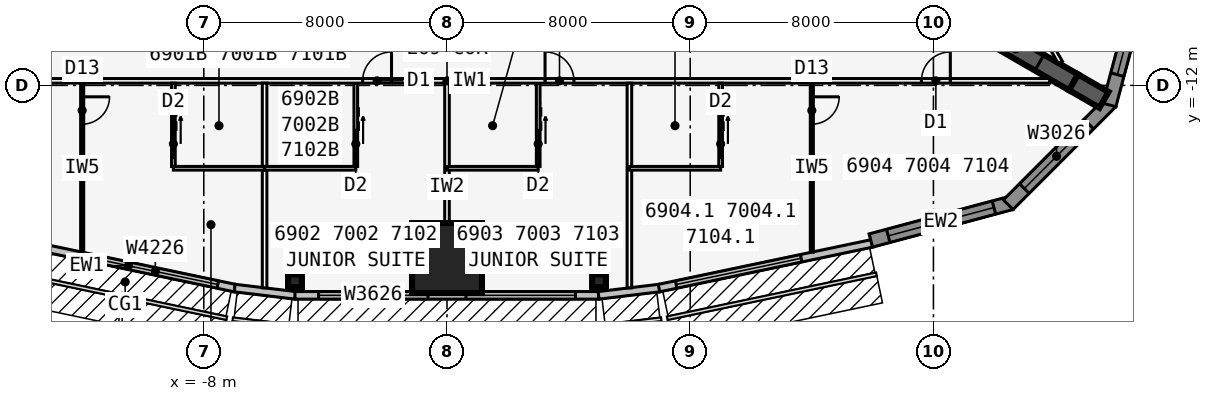
"""IFC4 building model, lengths in metres.
Left out: names, types, materials, properties, quantities, classifications, styles, units other than length and angle.
Written with IfcOpenShell. Run it as: python <this file> out.ifc"""

import sys

from ifc_helpers import new_model, si_unit, direction, frame, frame_2d, origin, origin_2d, place, context, subcontext, project, spatial, polyline, rectangle, i_section, outline, extrude, element, fill, save


model = new_model("IFC4")
c1 = context("Model", 3, precision=1e-05, world=origin(), true_north=direction((0.0, 1.0)))
c2 = subcontext(c1, "Body", "Model", "MODEL_VIEW")
j1 = project(units=[si_unit("LENGTHUNIT", "METRE"), si_unit("PLANEANGLEUNIT", "RADIAN")], contexts=[c1])
p1 = place(None, origin())
s1 = spatial("IfcSite", under=j1, at=p1, CompositionType="ELEMENT")
p2 = place(p1, origin())
s2 = spatial("IfcBuilding", under=s1, at=p2, CompositionType="ELEMENT")
p3 = place(p2, frame((0.0, 0.0, 260.9)))
s3 = spatial("IfcBuildingStorey", under=s2, at=p3, CompositionType="ELEMENT", Elevation=260.9)
p4 = place(p3, frame((16.5, -9.526, 0.0), z_axis=(0.0, 0.0, 1.0), x_axis=(0.866031398331, -0.499989616998, 0.0)))
e1 = element("IfcWall", 1, at=p4, inside=s3, PredefinedType="SHEAR", context=c2, shape_type="SweptSolid", body=[
    extrude(rectangle(XDim=4.746, YDim=0.6, at=frame_2d((2.373, 0.0))), origin(), (0.0, 0.0, 1.0), 3.6),
])
p5 = place(p4, frame((1.65, 0.0, 0.0)))
e2 = element("IfcOpeningElement", 2, at=p5, cuts=e1, PredefinedType="OPENING", context=c2, shape_type="SweptSolid", body=[
    extrude(rectangle(XDim=1.8, YDim=2.13, at=frame_2d((0.9, 1.065))), frame((0.0, 0.31, 0.0), z_axis=(0.0, -1.0, 0.0), x_axis=(1.0, 0.0, 0.0)), (0.0, 0.0, 1.0), 0.62),
])
p6 = place(p3, frame((20.61, -11.899, 0.0), z_axis=(0.0, 0.0, 1.0), x_axis=(0.866009537788, -0.500027479704, 0.0)))
e3 = element("IfcWall", 3, at=p6, inside=s3, PredefinedType="SHEAR", context=c2, shape_type="SweptSolid", body=[
    extrude(rectangle(XDim=1.155, YDim=0.6, at=frame_2d((0.577, 0.0))), origin(), (0.0, 0.0, 1.0), 3.6),
])
for number, where, z_axis, x_axis in (
    (4, (-5.0, -18.43, 0.0), (0.0, 0.0, 1.0), (0.0, -1.0, 0.0)),
    (5, (5.0, -18.43, 0.0), (0.0, 0.0, 1.0), (0.0, -1.0, 0.0)),
):
    element("IfcColumn", number, at=place(p3, frame(where, z_axis=z_axis, x_axis=x_axis)), inside=s3, PredefinedType="COLUMN", context=c2, shape_type="SweptSolid", body=[
        extrude(i_section(OverallWidth=0.419, OverallDepth=0.455, WebThickness=0.042, FlangeThickness=0.068, at=origin_2d()), origin(), (0.0, 0.0, 1.0), 3.6),
    ])
p7 = place(p3, frame((0.0, -17.68, 0.0), z_axis=(0.0, 0.0, 1.0), x_axis=(0.0, -1.0, 0.0)))
e6 = element("IfcColumn", 6, at=p7, inside=s3, PredefinedType="COLUMN", context=c2, shape_type="SweptSolid", body=[
    extrude(rectangle(XDim=2.3, YDim=2.3, at=origin_2d()), origin(), (0.0, 0.0, 1.0), 3.6),
])
p8 = place(p3, frame((-13.974, -17.198, 0.0), z_axis=(0.0, 0.0, 1.0), x_axis=(0.978654320409, -0.205513311355, 0.0)))
e7 = element("IfcWall", 7, at=p8, inside=s3, PredefinedType="STANDARD", context=c2, shape_type="SweptSolid", body=[
    extrude(rectangle(XDim=7.153, YDim=0.25, at=frame_2d((3.576, 0.0))), origin(), (0.0, 0.0, 1.0), 3.435),
])
p9 = place(p8, frame((2.376, 0.0, 0.45)))
e8 = element("IfcOpeningElement", 8, at=p9, cuts=e7, PredefinedType="OPENING", context=c2, shape_type="SweptSolid", body=[
    extrude(rectangle(XDim=4.2, YDim=2.6, at=frame_2d((2.1, 1.3))), frame((0.0, 0.135, 0.0), z_axis=(0.0, -1.0, 0.0), x_axis=(1.0, 0.0, 0.0)), (0.0, 0.0, 1.0), 0.27),
])
p10 = place(p3, frame((-6.985, -18.667, 0.0), z_axis=(0.0, 0.0, 1.0), x_axis=(0.992877411981, -0.119140441403, 0.0)))
e9 = element("IfcWall", 9, at=p10, inside=s3, PredefinedType="STANDARD", context=c2, shape_type="SweptSolid", body=[
    extrude(rectangle(XDim=2.014, YDim=0.25, at=frame_2d((1.007, 0.0))), origin(), (0.0, 0.0, 1.0), 3.435),
])
p11 = place(p3, frame((-5.0, -18.906, 0.0), z_axis=(0.0, 0.0, 1.0), x_axis=(1.0, 0.0, 0.0)))
e10 = element("IfcWall", 10, at=p11, inside=s3, PredefinedType="STANDARD", context=c2, shape_type="SweptSolid", body=[
    extrude(rectangle(XDim=10.0, YDim=0.25, at=frame_2d((5.0, 0.0))), origin(), (0.0, 0.0, 1.0), 3.435),
])
p12 = place(p11, frame((0.775, 0.0, 0.45)))
e11 = element("IfcOpeningElement", 11, at=p12, cuts=e10, PredefinedType="OPENING", context=c2, shape_type="SweptSolid", body=[
    extrude(rectangle(XDim=3.6, YDim=2.6, at=frame_2d((1.8, 1.3))), frame((0.0, 0.135, 0.0), z_axis=(0.0, -1.0, 0.0), x_axis=(1.0, 0.0, 0.0)), (0.0, 0.0, 1.0), 0.27),
])
p13 = place(p11, frame((5.625, 0.0, 0.45)))
e12 = element("IfcOpeningElement", 12, at=p13, cuts=e10, PredefinedType="OPENING", context=c2, shape_type="SweptSolid", body=[
    extrude(rectangle(XDim=3.6, YDim=2.6, at=frame_2d((1.8, 1.3))), frame((0.0, 0.135, 0.0), z_axis=(0.0, -1.0, 0.0), x_axis=(1.0, 0.0, 0.0)), (0.0, 0.0, 1.0), 0.27),
])
p14 = place(p3, frame((4.985, -18.906, 0.0), z_axis=(0.0, 0.0, 1.0), x_axis=(0.992877411981, 0.119140441403, 0.0)))
e13 = element("IfcWall", 13, at=p14, inside=s3, PredefinedType="STANDARD", context=c2, shape_type="SweptSolid", body=[
    extrude(rectangle(XDim=2.014, YDim=0.25, at=frame_2d((1.007, 0.0))), origin(), (0.0, 0.0, 1.0), 3.435),
])
p15 = place(p3, frame((6.974, -18.668, 0.0), z_axis=(0.0, 0.0, 1.0), x_axis=(0.978654320409, 0.205513311355, 0.0)))
e14 = element("IfcWall", 14, at=p15, inside=s3, PredefinedType="STANDARD", context=c2, shape_type="SweptSolid", body=[
    extrude(rectangle(XDim=7.153, YDim=0.25, at=frame_2d((3.576, 0.0))), origin(), (0.0, 0.0, 1.0), 3.435),
])
p16 = place(p15, frame((0.577, 0.0, 0.45)))
e15 = element("IfcOpeningElement", 15, at=p16, cuts=e14, PredefinedType="OPENING", context=c2, shape_type="SweptSolid", body=[
    extrude(rectangle(XDim=4.2, YDim=2.6, at=frame_2d((2.1, 1.3))), frame((0.0, 0.135, 0.0), z_axis=(0.0, -1.0, 0.0), x_axis=(1.0, 0.0, 0.0)), (0.0, 0.0, 1.0), 0.27),
])
p17 = place(p3, frame((13.942, -17.103, 0.0), z_axis=(0.0, 0.0, 1.0), x_axis=(0.965913862671, 0.258863689806, 0.0)))
e16 = element("IfcWall", 16, at=p17, inside=s3, PredefinedType="SOLIDWALL", context=c2, shape_type="SweptSolid", body=[
    extrude(rectangle(XDim=4.782, YDim=0.45, at=frame_2d((2.391, 0.0))), origin(), (0.0, 0.0, 1.0), 3.435),
])
p18 = place(p17, frame((0.591, 0.0, 0.45)))
e17 = element("IfcOpeningElement", 17, at=p18, cuts=e16, PredefinedType="OPENING", context=c2, shape_type="SweptSolid", body=[
    extrude(rectangle(XDim=3.6, YDim=2.6, at=frame_2d((1.8, 1.3))), frame((0.0, 0.235, 0.0), z_axis=(0.0, -1.0, 0.0), x_axis=(1.0, 0.0, 0.0)), (0.0, 0.0, 1.0), 0.47),
])
p19 = place(p3, frame((18.46, -15.924, 0.0), z_axis=(0.0, 0.0, 1.0), x_axis=(0.707081252484, 0.707132308968, 0.0)))
e18 = element("IfcWall", 18, at=p19, inside=s3, PredefinedType="SOLIDWALL", context=c2, shape_type="SweptSolid", body=[
    extrude(outline(polyline([(4.782, 0.225), (4.723, 0.225), (4.375, 0.132), (4.351, 0.225), (0.0, 0.225), (0.0, -0.225), (4.782, -0.225), (4.782, 0.225)])), origin(), (0.0, 0.0, 1.0), 3.435),
])
p20 = place(p19, frame((0.75, 0.0, 0.45)))
e19 = element("IfcOpeningElement", 19, at=p20, cuts=e18, PredefinedType="OPENING", context=c2, shape_type="SweptSolid", body=[
    extrude(rectangle(XDim=3.0, YDim=2.6, at=frame_2d((1.5, 1.3))), frame((0.0, 0.235, 0.0), z_axis=(0.0, -1.0, 0.0), x_axis=(1.0, 0.0, 0.0)), (0.0, 0.0, 1.0), 0.47),
])
p21 = place(p3, frame((21.783, -12.644, 0.0), z_axis=(0.0, 0.0, 1.0), x_axis=(0.25880328844, 0.965930048136, 0.0)))
e20 = element("IfcWall", 20, at=p21, inside=s3, PredefinedType="SOLIDWALL", context=c2, shape_type="SweptSolid", body=[
    extrude(outline(polyline([(4.782, 0.225), (0.431, 0.225), (0.406, 0.132), (0.06, 0.225), (0.0, 0.225), (0.0, -0.225), (4.782, -0.225), (4.782, 0.225)])), origin(), (0.0, 0.0, 1.0), 3.435),
])
p22 = place(p21, frame((1.031, 0.0, 0.45)))
e21 = element("IfcOpeningElement", 21, at=p22, cuts=e20, PredefinedType="OPENING", context=c2, shape_type="SweptSolid", body=[
    extrude(rectangle(XDim=3.0, YDim=2.6, at=frame_2d((1.5, 1.3))), frame((0.0, 0.235, 0.0), z_axis=(0.0, -1.0, 0.0), x_axis=(1.0, 0.0, 0.0)), (0.0, 0.0, 1.0), 0.47),
])
p23 = place(p3, frame((-19.827, -11.851, 0.0), z_axis=(0.0, 0.0, 1.0), x_axis=(1.0, 0.0, 0.0)))
e22 = element("IfcWall", 22, at=p23, inside=s3, PredefinedType="PARTITIONING", context=c2, shape_type="SweptSolid", body=[
    extrude(rectangle(XDim=39.654, YDim=0.15, at=frame_2d((19.827, 0.0))), origin(), (0.0, 0.0, 1.0), 3.435),
])
p24 = place(p23, frame((3.272, 0.0, 0.0)))
e23 = element("IfcOpeningElement", 23, at=p24, cuts=e22, PredefinedType="OPENING", context=c2, shape_type="SweptSolid", body=[
    extrude(rectangle(XDim=0.95, YDim=2.13, at=frame_2d((0.475, 1.065))), frame((0.0, 0.085, 0.0), z_axis=(0.0, -1.0, 0.0), x_axis=(1.0, 0.0, 0.0)), (0.0, 0.0, 1.0), 0.17),
])
p25 = place(p23, frame((17.052, 0.0, 0.0)))
e24 = element("IfcOpeningElement", 24, at=p25, cuts=e22, PredefinedType="OPENING", context=c2, shape_type="SweptSolid", body=[
    extrude(rectangle(XDim=0.95, YDim=2.13, at=frame_2d((0.475, 1.065))), frame((0.0, 0.085, 0.0), z_axis=(0.0, -1.0, 0.0), x_axis=(1.0, 0.0, 0.0)), (0.0, 0.0, 1.0), 0.17),
])
p26 = place(p23, frame((23.052, 0.0, 0.0)))
e25 = element("IfcOpeningElement", 25, at=p26, cuts=e22, PredefinedType="OPENING", context=c2, shape_type="SweptSolid", body=[
    extrude(rectangle(XDim=0.95, YDim=2.13, at=frame_2d((0.475, 1.065))), frame((0.0, 0.085, 0.0), z_axis=(0.0, -1.0, 0.0), x_axis=(1.0, 0.0, 0.0)), (0.0, 0.0, 1.0), 0.17),
])
p27 = place(p23, frame((35.432, 0.0, 0.0)))
e26 = element("IfcOpeningElement", 26, at=p27, cuts=e22, PredefinedType="OPENING", context=c2, shape_type="SweptSolid", body=[
    extrude(rectangle(XDim=0.95, YDim=2.13, at=frame_2d((0.475, 1.065))), frame((0.0, 0.085, 0.0), z_axis=(0.0, -1.0, 0.0), x_axis=(1.0, 0.0, 0.0)), (0.0, 0.0, 1.0), 0.17),
])
p28 = place(p3, frame((-12.0, -11.926, 0.0), z_axis=(0.0, 0.0, 1.0), x_axis=(0.0, -1.0, 0.0)))
e27 = element("IfcWall", 27, at=p28, inside=s3, PredefinedType="PARTITIONING", context=c2, shape_type="SweptSolid", body=[
    extrude(rectangle(XDim=5.559, YDim=0.1, at=frame_2d((2.779, 0.0))), origin(), (0.0, 0.0, 1.0), 2.823),
])
p29 = place(p28, frame((0.45, 0.0, 0.0)))
e28 = element("IfcOpeningElement", 28, at=p29, cuts=e27, PredefinedType="OPENING", context=c2, shape_type="SweptSolid", body=[
    extrude(rectangle(XDim=0.9, YDim=2.13, at=frame_2d((0.45, 1.065))), frame((0.0, 0.06, 0.0), z_axis=(0.0, -1.0, 0.0), x_axis=(1.0, 0.0, 0.0)), (0.0, 0.0, 1.0), 0.12),
])
p30 = place(p3, frame((-6.0, -11.926, 0.0), z_axis=(0.0, 0.0, 1.0), x_axis=(0.0, -1.0, 0.0)))
e29 = element("IfcWall", 29, at=p30, inside=s3, PredefinedType="PARTITIONING", context=c2, shape_type="SweptSolid", body=[
    extrude(rectangle(XDim=6.732, YDim=0.15, at=frame_2d((3.366, 0.0))), origin(), (0.0, 0.0, 1.0), 3.435),
])
p31 = place(p3, frame((0.0, -11.926, 0.0), z_axis=(0.0, 0.0, 1.0), x_axis=(0.0, -1.0, 0.0)))
e30 = element("IfcWall", 30, at=p31, inside=s3, PredefinedType="PARTITIONING", context=c2, shape_type="SweptSolid", body=[
    extrude(rectangle(XDim=6.854, YDim=0.15, at=frame_2d((3.427, 0.0))), origin(), (0.0, 0.0, 1.0), 2.678),
])
p32 = place(p3, frame((6.0, -11.926, 0.0), z_axis=(0.0, 0.0, 1.0), x_axis=(0.0, -1.0, 0.0)))
e31 = element("IfcWall", 31, at=p32, inside=s3, PredefinedType="PARTITIONING", context=c2, shape_type="SweptSolid", body=[
    extrude(rectangle(XDim=6.732, YDim=0.15, at=frame_2d((3.366, 0.0))), origin(), (0.0, 0.0, 1.0), 3.435),
])
p33 = place(p3, frame((12.0, -11.926, 0.0), z_axis=(0.0, 0.0, 1.0), x_axis=(0.0, -1.0, 0.0)))
e32 = element("IfcWall", 32, at=p33, inside=s3, PredefinedType="PARTITIONING", context=c2, shape_type="SweptSolid", body=[
    extrude(rectangle(XDim=5.559, YDim=0.1, at=frame_2d((2.779, 0.0))), origin(), (0.0, 0.0, 1.0), 2.823),
])
p34 = place(p33, frame((0.45, 0.0, 0.0)))
e33 = element("IfcOpeningElement", 33, at=p34, cuts=e32, PredefinedType="OPENING", context=c2, shape_type="SweptSolid", body=[
    extrude(rectangle(XDim=0.9, YDim=2.13, at=frame_2d((0.45, 1.065))), frame((0.0, 0.06, 0.0), z_axis=(0.0, -1.0, 0.0), x_axis=(1.0, 0.0, 0.0)), (0.0, 0.0, 1.0), 0.12),
])
p35 = place(p3, frame((-9.0, -14.726, 0.0), z_axis=(0.0, 0.0, 1.0), x_axis=(1.0, 0.0, 0.0)))
e34 = element("IfcWall", 34, at=p35, inside=s3, PredefinedType="PLUMBINGWALL", context=c2, shape_type="SweptSolid", body=[
    extrude(rectangle(XDim=3.0, YDim=0.12, at=frame_2d((1.5, 0.0))), origin(), (0.0, 0.0, 1.0), 3.435),
])
p36 = place(p3, frame((-9.0, -11.926, 0.0), z_axis=(0.0, 0.0, 1.0), x_axis=(0.0, -1.0, 0.0)))
e35 = element("IfcWall", 35, at=p36, inside=s3, PredefinedType="PLUMBINGWALL", context=c2, shape_type="SweptSolid", body=[
    extrude(rectangle(XDim=2.74, YDim=0.12, at=frame_2d((1.37, 0.0))), origin(), (0.0, 0.0, 1.0), 3.435),
])
p37 = place(p36, frame((1.55, 0.0, 0.0)))
e36 = element("IfcOpeningElement", 36, at=p37, cuts=e35, PredefinedType="OPENING", context=c2, shape_type="SweptSolid", body=[
    extrude(rectangle(XDim=0.9, YDim=2.13, at=frame_2d((0.45, 1.065))), frame((0.0, 0.07, 0.0), z_axis=(0.0, -1.0, 0.0), x_axis=(1.0, 0.0, 0.0)), (0.0, 0.0, 1.0), 0.14),
])
p38 = place(p3, frame((-6.0, -14.726, 0.0), z_axis=(0.0, 0.0, 1.0), x_axis=(1.0, 0.0, 0.0)))
e37 = element("IfcWall", 37, at=p38, inside=s3, PredefinedType="PLUMBINGWALL", context=c2, shape_type="SweptSolid", body=[
    extrude(rectangle(XDim=3.0, YDim=0.12, at=frame_2d((1.5, 0.0))), origin(), (0.0, 0.0, 1.0), 3.435),
])
p39 = place(p3, frame((-3.0, -11.926, 0.0), z_axis=(0.0, 0.0, 1.0), x_axis=(0.0, -1.0, 0.0)))
e38 = element("IfcWall", 38, at=p39, inside=s3, PredefinedType="PLUMBINGWALL", context=c2, shape_type="SweptSolid", body=[
    extrude(rectangle(XDim=2.74, YDim=0.12, at=frame_2d((1.37, 0.0))), origin(), (0.0, 0.0, 1.0), 3.435),
])
p40 = place(p39, frame((1.55, 0.0, 0.0)))
e39 = element("IfcOpeningElement", 39, at=p40, cuts=e38, PredefinedType="OPENING", context=c2, shape_type="SweptSolid", body=[
    extrude(rectangle(XDim=0.9, YDim=2.13, at=frame_2d((0.45, 1.065))), frame((0.0, 0.07, 0.0), z_axis=(0.0, -1.0, 0.0), x_axis=(1.0, 0.0, 0.0)), (0.0, 0.0, 1.0), 0.14),
])
p41 = place(p3, frame((0.0, -14.726, 0.0), z_axis=(0.0, 0.0, 1.0), x_axis=(1.0, 0.0, 0.0)))
e40 = element("IfcWall", 40, at=p41, inside=s3, PredefinedType="PLUMBINGWALL", context=c2, shape_type="SweptSolid", body=[
    extrude(rectangle(XDim=3.0, YDim=0.12, at=frame_2d((1.5, 0.0))), origin(), (0.0, 0.0, 1.0), 3.435),
])
p42 = place(p3, frame((3.0, -11.926, 0.0), z_axis=(0.0, 0.0, 1.0), x_axis=(0.0, -1.0, 0.0)))
e41 = element("IfcWall", 41, at=p42, inside=s3, PredefinedType="PLUMBINGWALL", context=c2, shape_type="SweptSolid", body=[
    extrude(rectangle(XDim=2.74, YDim=0.12, at=frame_2d((1.37, 0.0))), origin(), (0.0, 0.0, 1.0), 3.435),
])
p43 = place(p42, frame((1.55, 0.0, 0.0)))
e42 = element("IfcOpeningElement", 42, at=p43, cuts=e41, PredefinedType="OPENING", context=c2, shape_type="SweptSolid", body=[
    extrude(rectangle(XDim=0.9, YDim=2.13, at=frame_2d((0.45, 1.065))), frame((0.0, 0.07, 0.0), z_axis=(0.0, -1.0, 0.0), x_axis=(1.0, 0.0, 0.0)), (0.0, 0.0, 1.0), 0.14),
])
p44 = place(p3, frame((6.0, -14.726, 0.0), z_axis=(0.0, 0.0, 1.0), x_axis=(1.0, 0.0, 0.0)))
e43 = element("IfcWall", 43, at=p44, inside=s3, PredefinedType="PLUMBINGWALL", context=c2, shape_type="SweptSolid", body=[
    extrude(rectangle(XDim=3.0, YDim=0.12, at=frame_2d((1.5, 0.0))), origin(), (0.0, 0.0, 1.0), 3.435),
])
p45 = place(p3, frame((9.0, -11.926, 0.0), z_axis=(0.0, 0.0, 1.0), x_axis=(0.0, -1.0, 0.0)))
e44 = element("IfcWall", 44, at=p45, inside=s3, PredefinedType="PLUMBINGWALL", context=c2, shape_type="SweptSolid", body=[
    extrude(rectangle(XDim=2.74, YDim=0.12, at=frame_2d((1.37, 0.0))), origin(), (0.0, 0.0, 1.0), 3.435),
])
p46 = place(p45, frame((1.55, 0.0, 0.0)))
e45 = element("IfcOpeningElement", 45, at=p46, cuts=e44, PredefinedType="OPENING", context=c2, shape_type="SweptSolid", body=[
    extrude(rectangle(XDim=0.9, YDim=2.13, at=frame_2d((0.45, 1.065))), frame((0.0, 0.07, 0.0), z_axis=(0.0, -1.0, 0.0), x_axis=(1.0, 0.0, 0.0)), (0.0, 0.0, 1.0), 0.14),
])
p47 = place(p3, frame((20.177, -11.245, 0.0), z_axis=(0.0, 0.0, 1.0), x_axis=(-0.499998875317, 0.866026053119, 0.0)))
e46 = element("IfcWall", 46, at=p47, inside=s3, PredefinedType="PARTITIONING", context=c2, shape_type="SweptSolid", body=[
    extrude(rectangle(XDim=39.654, YDim=0.15, at=frame_2d((19.827, 0.0))), origin(), (0.0, 0.0, 1.0), 3.435),
])
p48 = place(p47, frame((10.352, 0.0, 0.0)))
e47 = element("IfcOpeningElement", 47, at=p48, cuts=e46, PredefinedType="OPENING", context=c2, shape_type="SweptSolid", body=[
    extrude(rectangle(XDim=0.95, YDim=2.13, at=frame_2d((0.475, 1.065))), frame((0.0, 0.085, 0.0), z_axis=(0.0, -1.0, 0.0), x_axis=(1.0, 0.0, 0.0)), (0.0, 0.0, 1.0), 0.17),
])
p49 = place(p9, origin())
e48 = element("IfcWindow", 48, at=p49, inside=s3, PartitioningType="SINGLE_PANEL", PredefinedType="WINDOW", context=c2, shape_type="SweptSolid", body=[
    extrude(rectangle(XDim=4.2, YDim=2.6, at=frame_2d((2.1, 1.3))), frame((0.0, 0.03, 0.0), z_axis=(0.0, -1.0, 0.0), x_axis=(1.0, 0.0, 0.0)), (0.0, 0.0, 1.0), 0.06),
])
fill(e8, e48)
p50 = place(p12, origin())
e49 = element("IfcWindow", 49, at=p50, inside=s3, PartitioningType="SINGLE_PANEL", PredefinedType="WINDOW", context=c2, shape_type="SweptSolid", body=[
    extrude(rectangle(XDim=3.6, YDim=2.6, at=frame_2d((1.8, 1.3))), frame((0.0, 0.03, 0.0), z_axis=(0.0, -1.0, 0.0), x_axis=(1.0, 0.0, 0.0)), (0.0, 0.0, 1.0), 0.06),
])
fill(e11, e49)
p51 = place(p13, origin())
e50 = element("IfcWindow", 50, at=p51, inside=s3, PartitioningType="SINGLE_PANEL", PredefinedType="WINDOW", context=c2, shape_type="SweptSolid", body=[
    extrude(rectangle(XDim=3.6, YDim=2.6, at=frame_2d((1.8, 1.3))), frame((0.0, 0.03, 0.0), z_axis=(0.0, -1.0, 0.0), x_axis=(1.0, 0.0, 0.0)), (0.0, 0.0, 1.0), 0.06),
])
fill(e12, e50)
p52 = place(p16, origin())
e51 = element("IfcWindow", 51, at=p52, inside=s3, PartitioningType="SINGLE_PANEL", PredefinedType="WINDOW", context=c2, shape_type="SweptSolid", body=[
    extrude(rectangle(XDim=4.2, YDim=2.6, at=frame_2d((2.1, 1.3))), frame((0.0, 0.03, 0.0), z_axis=(0.0, -1.0, 0.0), x_axis=(1.0, 0.0, 0.0)), (0.0, 0.0, 1.0), 0.06),
])
fill(e15, e51)
p53 = place(p18, origin())
e52 = element("IfcWindow", 52, at=p53, inside=s3, PartitioningType="SINGLE_PANEL", PredefinedType="WINDOW", context=c2, shape_type="SweptSolid", body=[
    extrude(rectangle(XDim=3.6, YDim=2.6, at=frame_2d((1.8, 1.3))), frame((0.0, 0.03, 0.0), z_axis=(0.0, -1.0, 0.0), x_axis=(1.0, 0.0, 0.0)), (0.0, 0.0, 1.0), 0.06),
])
fill(e17, e52)
p54 = place(p20, origin())
e53 = element("IfcWindow", 53, at=p54, inside=s3, PartitioningType="SINGLE_PANEL", PredefinedType="WINDOW", context=c2, shape_type="SweptSolid", body=[
    extrude(rectangle(XDim=3.0, YDim=2.6, at=frame_2d((1.5, 1.3))), frame((0.0, 0.03, 0.0), z_axis=(0.0, -1.0, 0.0), x_axis=(1.0, 0.0, 0.0)), (0.0, 0.0, 1.0), 0.06),
])
fill(e19, e53)
p55 = place(p22, origin())
e54 = element("IfcWindow", 54, at=p55, inside=s3, PartitioningType="SINGLE_PANEL", PredefinedType="WINDOW", context=c2, shape_type="SweptSolid", body=[
    extrude(rectangle(XDim=3.0, YDim=2.6, at=frame_2d((1.5, 1.3))), frame((0.0, 0.03, 0.0), z_axis=(0.0, -1.0, 0.0), x_axis=(1.0, 0.0, 0.0)), (0.0, 0.0, 1.0), 0.06),
])
fill(e21, e54)
p56 = place(p29, origin())
e55 = element("IfcDoor", 55, at=p56, inside=s3, OperationType="SINGLE_SWING_LEFT", PredefinedType="DOOR", context=c2, shape_type="SweptSolid", body=[
    extrude(rectangle(XDim=0.9, YDim=2.13, at=frame_2d((0.45, 1.065))), frame((0.0, 0.025, 0.0), z_axis=(0.0, -1.0, 0.0), x_axis=(1.0, 0.0, 0.0)), (0.0, 0.0, 1.0), 0.05),
])
fill(e28, e55)
p57 = place(p34, origin())
e56 = element("IfcDoor", 56, at=p57, inside=s3, OperationType="SINGLE_SWING_LEFT", PredefinedType="DOOR", context=c2, shape_type="SweptSolid", body=[
    extrude(rectangle(XDim=0.9, YDim=2.13, at=frame_2d((0.45, 1.065))), frame((0.0, 0.025, 0.0), z_axis=(0.0, -1.0, 0.0), x_axis=(1.0, 0.0, 0.0)), (0.0, 0.0, 1.0), 0.05),
])
fill(e33, e56)
p58 = place(p37, origin())
e57 = element("IfcDoor", 57, at=p58, inside=s3, OperationType="SLIDING_TO_LEFT", PredefinedType="DOOR", context=c2, shape_type="SweptSolid", body=[
    extrude(rectangle(XDim=0.9, YDim=2.13, at=frame_2d((0.45, 1.065))), frame((0.0, 0.025, 0.0), z_axis=(0.0, -1.0, 0.0), x_axis=(1.0, 0.0, 0.0)), (0.0, 0.0, 1.0), 0.05),
])
fill(e36, e57)
p59 = place(p40, origin())
e58 = element("IfcDoor", 58, at=p59, inside=s3, OperationType="SLIDING_TO_LEFT", PredefinedType="DOOR", context=c2, shape_type="SweptSolid", body=[
    extrude(rectangle(XDim=0.9, YDim=2.13, at=frame_2d((0.45, 1.065))), frame((0.0, 0.025, 0.0), z_axis=(0.0, -1.0, 0.0), x_axis=(1.0, 0.0, 0.0)), (0.0, 0.0, 1.0), 0.05),
])
fill(e39, e58)
p60 = place(p25, origin())
e59 = element("IfcDoor", 59, at=p60, inside=s3, OperationType="SINGLE_SWING_RIGHT", PredefinedType="DOOR", context=c2, shape_type="SweptSolid", body=[
    extrude(rectangle(XDim=0.95, YDim=2.13, at=frame_2d((0.475, 1.065))), frame((0.0, 0.025, 0.0), z_axis=(0.0, -1.0, 0.0), x_axis=(1.0, 0.0, 0.0)), (0.0, 0.0, 1.0), 0.05),
])
fill(e24, e59)
p61 = place(p43, origin())
e60 = element("IfcDoor", 60, at=p61, inside=s3, OperationType="SLIDING_TO_LEFT", PredefinedType="DOOR", context=c2, shape_type="SweptSolid", body=[
    extrude(rectangle(XDim=0.9, YDim=2.13, at=frame_2d((0.45, 1.065))), frame((0.0, 0.025, 0.0), z_axis=(0.0, -1.0, 0.0), x_axis=(1.0, 0.0, 0.0)), (0.0, 0.0, 1.0), 0.05),
])
fill(e42, e60)
p62 = place(p26, origin())
e61 = element("IfcDoor", 61, at=p62, inside=s3, OperationType="SINGLE_SWING_LEFT", PredefinedType="DOOR", context=c2, shape_type="SweptSolid", body=[
    extrude(rectangle(XDim=0.95, YDim=2.13, at=frame_2d((0.475, 1.065))), frame((0.0, 0.025, 0.0), z_axis=(0.0, -1.0, 0.0), x_axis=(1.0, 0.0, 0.0)), (0.0, 0.0, 1.0), 0.05),
])
fill(e25, e61)
p63 = place(p46, origin())
e62 = element("IfcDoor", 62, at=p63, inside=s3, OperationType="SLIDING_TO_LEFT", PredefinedType="DOOR", context=c2, shape_type="SweptSolid", body=[
    extrude(rectangle(XDim=0.9, YDim=2.13, at=frame_2d((0.45, 1.065))), frame((0.0, 0.025, 0.0), z_axis=(0.0, -1.0, 0.0), x_axis=(1.0, 0.0, 0.0)), (0.0, 0.0, 1.0), 0.05),
])
fill(e45, e62)
p64 = place(p27, origin())
e63 = element("IfcDoor", 63, at=p64, inside=s3, OperationType="SINGLE_SWING_RIGHT", PredefinedType="DOOR", context=c2, shape_type="SweptSolid", body=[
    extrude(rectangle(XDim=0.95, YDim=2.13, at=frame_2d((0.475, 1.065))), frame((0.0, 0.025, 0.0), z_axis=(0.0, -1.0, 0.0), x_axis=(1.0, 0.0, 0.0)), (0.0, 0.0, 1.0), 0.05),
])
fill(e26, e63)
p65 = place(p5, origin())
e64 = element("IfcDoor", 64, at=p65, inside=s3, OperationType="DOUBLE_DOOR_DOUBLE_SWING", PredefinedType="DOOR", context=c2, shape_type="SweptSolid", body=[
    extrude(rectangle(XDim=1.8, YDim=2.13, at=frame_2d((0.9, 1.065))), frame((0.0, 0.025, 0.0), z_axis=(0.0, -1.0, 0.0), x_axis=(1.0, 0.0, 0.0)), (0.0, 0.0, 1.0), 0.05),
])
fill(e2, e64)
save(model, sys.argv[1])
